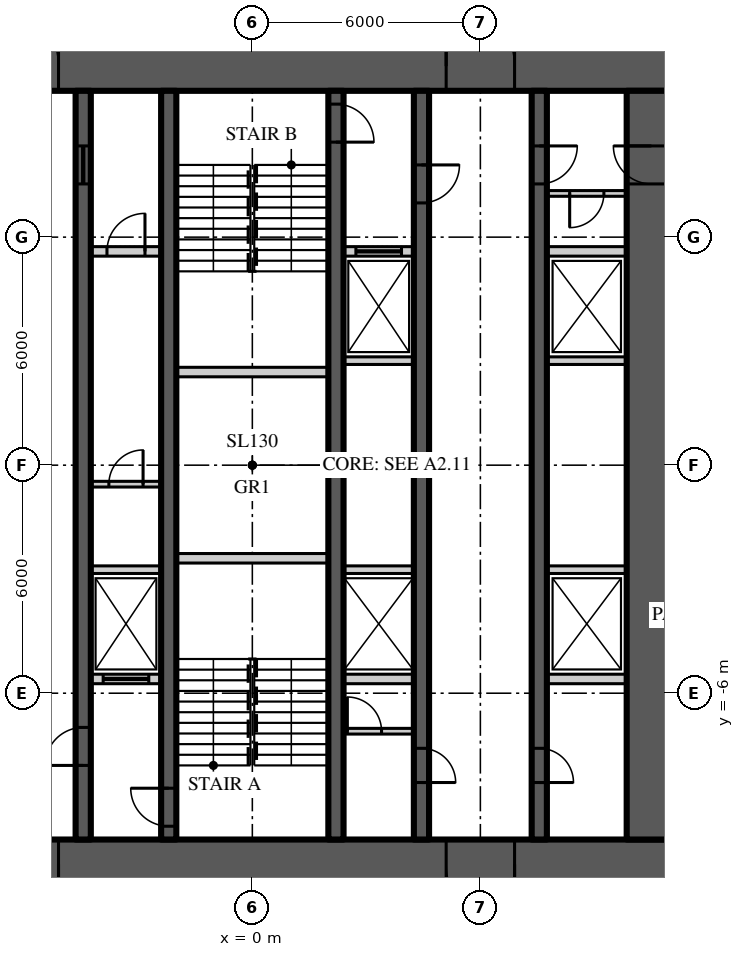
"""IFC4 building model, lengths in metres.
Left out: names, types, materials, properties, quantities, classifications, styles, units other than length and angle.
Written with IfcOpenShell. Run it as: python <this file> out.ifc"""

import sys

from ifc_helpers import new_model, si_unit, direction, frame, frame_2d, origin, place, context, subcontext, project, spatial, rectangle, extrude, element, fill, save


model = new_model("IFC4")
c1 = context("Model", 3, precision=1e-05, world=origin(), true_north=direction((0.0, 1.0)))
c2 = subcontext(c1, "Body", "Model", "MODEL_VIEW")
j1 = project(units=[si_unit("LENGTHUNIT", "METRE"), si_unit("PLANEANGLEUNIT", "RADIAN")], contexts=[c1])
p1 = place(None, origin())
s1 = spatial("IfcSite", under=j1, at=p1, CompositionType="ELEMENT")
p2 = place(p1, origin())
s2 = spatial("IfcBuilding", under=s1, at=p2, CompositionType="ELEMENT")
p3 = place(p2, frame((0.0, 0.0, 55.2)))
s3 = spatial("IfcBuildingStorey", under=s2, at=p3, CompositionType="ELEMENT", Elevation=55.2)
p4 = place(p3, frame((-11.15, 10.5, 0.0), z_axis=(0.0, 0.0, 1.0), x_axis=(1.0, 0.0, 0.0)))
e1 = element("IfcWall", 1, at=p4, inside=s3, PredefinedType="SHEAR", context=c2, shape_type="SweptSolid", body=[
    extrude(rectangle(XDim=22.3, YDim=1.3, at=frame_2d((11.15, 0.0))), origin(), (0.0, 0.0, 1.0), 3.9),
])
p5 = place(p4, frame((4.25, 0.0, 0.0)))
e2 = element("IfcOpeningElement", 2, at=p5, cuts=e1, PredefinedType="OPENING", context=c2, shape_type="SweptSolid", body=[
    extrude(rectangle(XDim=1.8, YDim=2.2, at=frame_2d((0.9, 1.1))), frame((0.0, 0.66, 0.0), z_axis=(0.0, -1.0, 0.0), x_axis=(1.0, 0.0, 0.0)), (0.0, 0.0, 1.0), 1.32),
])
p6 = place(p4, frame((16.25, 0.0, 0.0)))
e3 = element("IfcOpeningElement", 3, at=p6, cuts=e1, PredefinedType="OPENING", context=c2, shape_type="SweptSolid", body=[
    extrude(rectangle(XDim=1.8, YDim=2.2, at=frame_2d((0.9, 1.1))), frame((0.0, 0.66, 0.0), z_axis=(0.0, -1.0, 0.0), x_axis=(1.0, 0.0, 0.0)), (0.0, 0.0, 1.0), 1.32),
])
p7 = place(p3, frame((11.15, -10.5, 0.0), z_axis=(0.0, 0.0, 1.0), x_axis=(-1.0, 0.0, 0.0)))
e4 = element("IfcWall", 4, at=p7, inside=s3, PredefinedType="SHEAR", context=c2, shape_type="SweptSolid", body=[
    extrude(rectangle(XDim=22.3, YDim=1.3, at=frame_2d((11.15, 0.0))), origin(), (0.0, 0.0, 1.0), 3.9),
])
p8 = place(p7, frame((16.25, 0.0, 0.0)))
e5 = element("IfcOpeningElement", 5, at=p8, cuts=e4, PredefinedType="OPENING", context=c2, shape_type="SweptSolid", body=[
    extrude(rectangle(XDim=1.8, YDim=2.2, at=frame_2d((0.9, 1.1))), frame((0.0, 0.66, 0.0), z_axis=(0.0, -1.0, 0.0), x_axis=(1.0, 0.0, 0.0)), (0.0, 0.0, 1.0), 1.32),
])
p9 = place(p7, frame((4.25, 0.0, 0.0)))
e6 = element("IfcOpeningElement", 6, at=p9, cuts=e4, PredefinedType="OPENING", context=c2, shape_type="SweptSolid", body=[
    extrude(rectangle(XDim=1.8, YDim=2.2, at=frame_2d((0.9, 1.1))), frame((0.0, 0.66, 0.0), z_axis=(0.0, -1.0, 0.0), x_axis=(1.0, 0.0, 0.0)), (0.0, 0.0, 1.0), 1.32),
])
p10 = place(p3, frame((10.5, -9.85, 0.0), z_axis=(0.0, 0.0, 1.0), x_axis=(0.0, 1.0, 0.0)))
e7 = element("IfcWall", 7, at=p10, inside=s3, PredefinedType="SHEAR", context=c2, shape_type="SweptSolid", body=[
    extrude(rectangle(XDim=19.7, YDim=1.3, at=frame_2d((9.85, 0.0))), origin(), (0.0, 0.0, 1.0), 3.9),
])
p11 = place(p10, frame((17.25, 0.0, 0.0)))
e8 = element("IfcOpeningElement", 8, at=p11, cuts=e7, PredefinedType="OPENING", context=c2, shape_type="SweptSolid", body=[
    extrude(rectangle(XDim=1.0, YDim=2.2, at=frame_2d((0.5, 1.1))), frame((0.0, 0.66, 0.0), z_axis=(0.0, -1.0, 0.0), x_axis=(1.0, 0.0, 0.0)), (0.0, 0.0, 1.0), 1.32),
])
p12 = place(p3, frame((7.55, 9.85, 0.0), z_axis=(0.0, 0.0, 1.0), x_axis=(0.0, -1.0, 0.0)))
e9 = element("IfcWall", 9, at=p12, inside=s3, PredefinedType="SHEAR", context=c2, shape_type="SweptSolid", body=[
    extrude(rectangle(XDim=19.7, YDim=0.4, at=frame_2d((9.85, 0.0))), origin(), (0.0, 0.0, 1.0), 3.9),
])
p13 = place(p12, frame((1.45, 0.0, 0.0)))
e10 = element("IfcOpeningElement", 10, at=p13, cuts=e9, PredefinedType="OPENING", context=c2, shape_type="SweptSolid", body=[
    extrude(rectangle(XDim=1.0, YDim=2.2, at=frame_2d((0.5, 1.1))), frame((0.0, 0.21, 0.0), z_axis=(0.0, -1.0, 0.0), x_axis=(1.0, 0.0, 0.0)), (0.0, 0.0, 1.0), 0.42),
])
p14 = place(p12, frame((17.3, 0.0, 0.0)))
e11 = element("IfcOpeningElement", 11, at=p14, cuts=e9, PredefinedType="OPENING", context=c2, shape_type="SweptSolid", body=[
    extrude(rectangle(XDim=0.9, YDim=2.1, at=frame_2d((0.45, 1.05))), frame((0.0, 0.21, 0.0), z_axis=(0.0, -1.0, 0.0), x_axis=(1.0, 0.0, 0.0)), (0.0, 0.0, 1.0), 0.42),
])
p15 = place(p3, frame((-4.45, -9.85, 0.0), z_axis=(0.0, 0.0, 1.0), x_axis=(0.0, 1.0, 0.0)))
e12 = element("IfcWall", 12, at=p15, inside=s3, PredefinedType="SHEAR", context=c2, shape_type="SweptSolid", body=[
    extrude(rectangle(XDim=19.7, YDim=0.4, at=frame_2d((9.85, 0.0))), origin(), (0.0, 0.0, 1.0), 3.9),
])
p16 = place(p15, frame((1.95, 0.0, 0.0)))
e13 = element("IfcOpeningElement", 13, at=p16, cuts=e12, PredefinedType="OPENING", context=c2, shape_type="SweptSolid", body=[
    extrude(rectangle(XDim=1.0, YDim=2.2, at=frame_2d((0.5, 1.1))), frame((0.0, 0.21, 0.0), z_axis=(0.0, -1.0, 0.0), x_axis=(1.0, 0.0, 0.0)), (0.0, 0.0, 1.0), 0.42),
])
p17 = place(p15, frame((17.25, 0.0, 0.0)))
e14 = element("IfcOpeningElement", 14, at=p17, cuts=e12, PredefinedType="OPENING", context=c2, shape_type="SweptSolid", body=[
    extrude(rectangle(XDim=1.0, YDim=2.1, at=frame_2d((0.5, 1.05))), frame((0.0, 0.21, 0.0), z_axis=(0.0, -1.0, 0.0), x_axis=(1.0, 0.0, 0.0)), (0.0, 0.0, 1.0), 0.42),
])
p18 = place(p3, frame((4.45, 9.85, 0.0), z_axis=(0.0, 0.0, 1.0), x_axis=(0.0, -1.0, 0.0)))
e15 = element("IfcWall", 15, at=p18, inside=s3, PredefinedType="SHEAR", context=c2, shape_type="SweptSolid", body=[
    extrude(rectangle(XDim=19.7, YDim=0.4, at=frame_2d((9.85, 0.0))), origin(), (0.0, 0.0, 1.0), 3.9),
])
p19 = place(p18, frame((1.95, 0.0, 0.0)))
e16 = element("IfcOpeningElement", 16, at=p19, cuts=e15, PredefinedType="OPENING", context=c2, shape_type="SweptSolid", body=[
    extrude(rectangle(XDim=1.0, YDim=2.2, at=frame_2d((0.5, 1.1))), frame((0.0, 0.21, 0.0), z_axis=(0.0, -1.0, 0.0), x_axis=(1.0, 0.0, 0.0)), (0.0, 0.0, 1.0), 0.42),
])
p20 = place(p18, frame((17.3, 0.0, 0.0)))
e17 = element("IfcOpeningElement", 17, at=p20, cuts=e15, PredefinedType="OPENING", context=c2, shape_type="SweptSolid", body=[
    extrude(rectangle(XDim=0.9, YDim=2.1, at=frame_2d((0.45, 1.05))), frame((0.0, 0.21, 0.0), z_axis=(0.0, -1.0, 0.0), x_axis=(1.0, 0.0, 0.0)), (0.0, 0.0, 1.0), 0.42),
])
p21 = place(p3, frame((-2.2, -9.85, 0.0), z_axis=(0.0, 0.0, 1.0), x_axis=(0.0, 1.0, 0.0)))
e18 = element("IfcWall", 18, at=p21, inside=s3, PredefinedType="SHEAR", context=c2, shape_type="SweptSolid", body=[
    extrude(rectangle(XDim=19.7, YDim=0.4, at=frame_2d((9.85, 0.0))), origin(), (0.0, 0.0, 1.0), 3.9),
])
p22 = place(p21, frame((0.35, 0.0, 0.0)))
e19 = element("IfcOpeningElement", 19, at=p22, cuts=e18, PredefinedType="OPENING", context=c2, shape_type="SweptSolid", body=[
    extrude(rectangle(XDim=1.0, YDim=2.2, at=frame_2d((0.5, 1.1))), frame((0.0, 0.21, 0.0), z_axis=(0.0, -1.0, 0.0), x_axis=(1.0, 0.0, 0.0)), (0.0, 0.0, 1.0), 0.42),
])
p23 = place(p3, frame((2.2, 9.85, 0.0), z_axis=(0.0, 0.0, 1.0), x_axis=(0.0, -1.0, 0.0)))
e20 = element("IfcWall", 20, at=p23, inside=s3, PredefinedType="SHEAR", context=c2, shape_type="SweptSolid", body=[
    extrude(rectangle(XDim=19.7, YDim=0.4, at=frame_2d((9.85, 0.0))), origin(), (0.0, 0.0, 1.0), 3.9),
])
p24 = place(p23, frame((0.35, 0.0, 0.0)))
e21 = element("IfcOpeningElement", 21, at=p24, cuts=e20, PredefinedType="OPENING", context=c2, shape_type="SweptSolid", body=[
    extrude(rectangle(XDim=1.0, YDim=2.2, at=frame_2d((0.5, 1.1))), frame((0.0, 0.21, 0.0), z_axis=(0.0, -1.0, 0.0), x_axis=(1.0, 0.0, 0.0)), (0.0, 0.0, 1.0), 0.42),
])
p25 = place(p3, frame((-4.25, 5.625, 0.0), z_axis=(0.0, 0.0, 1.0), x_axis=(1.0, 0.0, 0.0)))
e22 = element("IfcWall", 22, at=p25, inside=s3, PredefinedType="SOLIDWALL", context=c2, shape_type="SweptSolid", body=[
    extrude(rectangle(XDim=1.85, YDim=0.25, at=frame_2d((0.925, 0.0))), origin(), (0.0, 0.0, 1.0), 3.7),
])
p26 = place(p25, frame((0.425, 0.0, 0.0)))
e23 = element("IfcOpeningElement", 23, at=p26, cuts=e22, PredefinedType="OPENING", context=c2, shape_type="SweptSolid", body=[
    extrude(rectangle(XDim=1.0, YDim=2.2, at=frame_2d((0.5, 1.1))), frame((0.0, 0.135, 0.0), z_axis=(0.0, -1.0, 0.0), x_axis=(1.0, 0.0, 0.0)), (0.0, 0.0, 1.0), 0.27),
])
p27 = place(p3, frame((2.4, 5.625, 0.0), z_axis=(0.0, 0.0, 1.0), x_axis=(1.0, 0.0, 0.0)))
e24 = element("IfcWall", 24, at=p27, inside=s3, PredefinedType="SOLIDWALL", context=c2, shape_type="SweptSolid", body=[
    extrude(rectangle(XDim=1.85, YDim=0.25, at=frame_2d((0.925, 0.0))), origin(), (0.0, 0.0, 1.0), 3.7),
])
p28 = place(p27, frame((0.325, 0.0, 0.0)))
e25 = element("IfcOpeningElement", 25, at=p28, cuts=e24, PredefinedType="OPENING", context=c2, shape_type="SweptSolid", body=[
    extrude(rectangle(XDim=1.2, YDim=2.2, at=frame_2d((0.6, 1.1))), frame((0.0, 0.135, 0.0), z_axis=(0.0, -1.0, 0.0), x_axis=(1.0, 0.0, 0.0)), (0.0, 0.0, 1.0), 0.27),
])
p29 = place(p3, frame((7.75, 5.625, 0.0), z_axis=(0.0, 0.0, 1.0), x_axis=(1.0, 0.0, 0.0)))
e26 = element("IfcWall", 26, at=p29, inside=s3, PredefinedType="SOLIDWALL", context=c2, shape_type="SweptSolid", body=[
    extrude(rectangle(XDim=2.1, YDim=0.25, at=frame_2d((1.05, 0.0))), origin(), (0.0, 0.0, 1.0), 3.7),
])
p30 = place(p3, frame((-4.25, -5.625, 0.0), z_axis=(0.0, 0.0, 1.0), x_axis=(1.0, 0.0, 0.0)))
e27 = element("IfcWall", 27, at=p30, inside=s3, PredefinedType="SOLIDWALL", context=c2, shape_type="SweptSolid", body=[
    extrude(rectangle(XDim=1.85, YDim=0.25, at=frame_2d((0.925, 0.0))), origin(), (0.0, 0.0, 1.0), 3.7),
])
p31 = place(p30, frame((0.325, 0.0, 0.0)))
e28 = element("IfcOpeningElement", 28, at=p31, cuts=e27, PredefinedType="OPENING", context=c2, shape_type="SweptSolid", body=[
    extrude(rectangle(XDim=1.2, YDim=2.2, at=frame_2d((0.6, 1.1))), frame((0.0, 0.135, 0.0), z_axis=(0.0, -1.0, 0.0), x_axis=(1.0, 0.0, 0.0)), (0.0, 0.0, 1.0), 0.27),
])
p32 = place(p3, frame((2.4, -5.625, 0.0), z_axis=(0.0, 0.0, 1.0), x_axis=(1.0, 0.0, 0.0)))
e29 = element("IfcWall", 29, at=p32, inside=s3, PredefinedType="SOLIDWALL", context=c2, shape_type="SweptSolid", body=[
    extrude(rectangle(XDim=1.85, YDim=0.25, at=frame_2d((0.925, 0.0))), origin(), (0.0, 0.0, 1.0), 3.7),
])
p33 = place(p3, frame((7.75, -5.625, 0.0), z_axis=(0.0, 0.0, 1.0), x_axis=(1.0, 0.0, 0.0)))
e30 = element("IfcWall", 30, at=p33, inside=s3, PredefinedType="SOLIDWALL", context=c2, shape_type="SweptSolid", body=[
    extrude(rectangle(XDim=2.1, YDim=0.25, at=frame_2d((1.05, 0.0))), origin(), (0.0, 0.0, 1.0), 3.7),
])
for number, where, z_axis, x_axis in (
    (31, (-2.0, -2.45, 0.0), (0.0, 0.0, 1.0), (1.0, 0.0, 0.0)),
    (32, (-2.0, 2.45, 0.0), (0.0, 0.0, 1.0), (1.0, 0.0, 0.0)),
):
    element("IfcWall", number, at=place(p3, frame(where, z_axis=z_axis, x_axis=x_axis)), inside=s3, PredefinedType="SOLIDWALL", context=c2, shape_type="SweptSolid", body=[
        extrude(rectangle(XDim=4.0, YDim=0.25, at=frame_2d((2.0, 0.0))), origin(), (0.0, 0.0, 1.0), 3.7),
    ])
for number, where, z_axis, x_axis in (
    (33, (-4.25, -2.75, 0.0), (0.0, 0.0, 1.0), (1.0, 0.0, 0.0)),
    (34, (2.4, -2.75, 0.0), (0.0, 0.0, 1.0), (1.0, 0.0, 0.0)),
):
    element("IfcWall", number, at=place(p3, frame(where, z_axis=z_axis, x_axis=x_axis)), inside=s3, PredefinedType="SOLIDWALL", context=c2, shape_type="SweptSolid", body=[
        extrude(rectangle(XDim=1.85, YDim=0.2, at=frame_2d((0.925, 0.0))), origin(), (0.0, 0.0, 1.0), 3.7),
    ])
p34 = place(p3, frame((7.75, -2.75, 0.0), z_axis=(0.0, 0.0, 1.0), x_axis=(1.0, 0.0, 0.0)))
e35 = element("IfcWall", 35, at=p34, inside=s3, PredefinedType="SOLIDWALL", context=c2, shape_type="SweptSolid", body=[
    extrude(rectangle(XDim=2.1, YDim=0.2, at=frame_2d((1.05, 0.0))), origin(), (0.0, 0.0, 1.0), 3.7),
])
p35 = place(p3, frame((2.4, 2.75, 0.0), z_axis=(0.0, 0.0, 1.0), x_axis=(1.0, 0.0, 0.0)))
e36 = element("IfcWall", 36, at=p35, inside=s3, PredefinedType="SOLIDWALL", context=c2, shape_type="SweptSolid", body=[
    extrude(rectangle(XDim=1.85, YDim=0.2, at=frame_2d((0.925, 0.0))), origin(), (0.0, 0.0, 1.0), 3.7),
])
p36 = place(p3, frame((7.75, 2.75, 0.0), z_axis=(0.0, 0.0, 1.0), x_axis=(1.0, 0.0, 0.0)))
e37 = element("IfcWall", 37, at=p36, inside=s3, PredefinedType="SOLIDWALL", context=c2, shape_type="SweptSolid", body=[
    extrude(rectangle(XDim=2.1, YDim=0.2, at=frame_2d((1.05, 0.0))), origin(), (0.0, 0.0, 1.0), 3.7),
])
p37 = place(p3, frame((-4.25, -0.5, 0.0), z_axis=(0.0, 0.0, 1.0), x_axis=(1.0, 0.0, 0.0)))
e38 = element("IfcWall", 38, at=p37, inside=s3, PredefinedType="SOLIDWALL", context=c2, shape_type="SweptSolid", body=[
    extrude(rectangle(XDim=1.85, YDim=0.15, at=frame_2d((0.925, 0.0))), origin(), (0.0, 0.0, 1.0), 3.77),
])
p38 = place(p37, frame((0.475, 0.0, 0.0)))
e39 = element("IfcOpeningElement", 39, at=p38, cuts=e38, PredefinedType="OPENING", context=c2, shape_type="SweptSolid", body=[
    extrude(rectangle(XDim=0.9, YDim=2.1, at=frame_2d((0.45, 1.05))), frame((0.0, 0.085, 0.0), z_axis=(0.0, -1.0, 0.0), x_axis=(1.0, 0.0, 0.0)), (0.0, 0.0, 1.0), 0.17),
])
p39 = place(p3, frame((2.4, -7.0, 0.0), z_axis=(0.0, 0.0, 1.0), x_axis=(1.0, 0.0, 0.0)))
e40 = element("IfcWall", 40, at=p39, inside=s3, PredefinedType="SOLIDWALL", context=c2, shape_type="SweptSolid", body=[
    extrude(rectangle(XDim=1.85, YDim=0.15, at=frame_2d((0.925, 0.0))), origin(), (0.0, 0.0, 1.0), 3.77),
])
p40 = place(p39, frame((0.1, 0.0, 0.0)))
e41 = element("IfcOpeningElement", 41, at=p40, cuts=e40, PredefinedType="OPENING", context=c2, shape_type="SweptSolid", body=[
    extrude(rectangle(XDim=0.9, YDim=2.1, at=frame_2d((0.45, 1.05))), frame((0.0, 0.085, 0.0), z_axis=(0.0, -1.0, 0.0), x_axis=(1.0, 0.0, 0.0)), (0.0, 0.0, 1.0), 0.17),
])
p41 = place(p3, frame((9.85, 7.15, 0.0), z_axis=(0.0, 0.0, 1.0), x_axis=(-1.0, 0.0, 0.0)))
e42 = element("IfcWall", 42, at=p41, inside=s3, PredefinedType="SOLIDWALL", context=c2, shape_type="SweptSolid", body=[
    extrude(rectangle(XDim=2.1, YDim=0.15, at=frame_2d((1.05, 0.0))), origin(), (0.0, 0.0, 1.0), 3.77),
])
p42 = place(p41, frame((0.6, 0.0, 0.0)))
e43 = element("IfcOpeningElement", 43, at=p42, cuts=e42, PredefinedType="OPENING", context=c2, shape_type="SweptSolid", body=[
    extrude(rectangle(XDim=0.9, YDim=2.1, at=frame_2d((0.45, 1.05))), frame((0.0, 0.085, 0.0), z_axis=(0.0, -1.0, 0.0), x_axis=(1.0, 0.0, 0.0)), (0.0, 0.0, 1.0), 0.17),
])
p43 = place(p5, origin())
e44 = element("IfcDoor", 44, at=p43, inside=s3, OperationType="DOUBLE_DOOR_DOUBLE_SWING", PredefinedType="DOOR", context=c2, shape_type="SweptSolid", body=[
    extrude(rectangle(XDim=1.8, YDim=2.2, at=frame_2d((0.9, 1.1))), frame((0.0, 0.025, 0.0), z_axis=(0.0, -1.0, 0.0), x_axis=(1.0, 0.0, 0.0)), (0.0, 0.0, 1.0), 0.05),
])
fill(e2, e44)
p44 = place(p8, origin())
e45 = element("IfcDoor", 45, at=p44, inside=s3, OperationType="DOUBLE_DOOR_DOUBLE_SWING", PredefinedType="DOOR", context=c2, shape_type="SweptSolid", body=[
    extrude(rectangle(XDim=1.8, YDim=2.2, at=frame_2d((0.9, 1.1))), frame((0.0, 0.025, 0.0), z_axis=(0.0, -1.0, 0.0), x_axis=(1.0, 0.0, 0.0)), (0.0, 0.0, 1.0), 0.05),
])
fill(e5, e45)
p45 = place(p6, origin())
e46 = element("IfcDoor", 46, at=p45, inside=s3, OperationType="DOUBLE_DOOR_DOUBLE_SWING", PredefinedType="DOOR", context=c2, shape_type="SweptSolid", body=[
    extrude(rectangle(XDim=1.8, YDim=2.2, at=frame_2d((0.9, 1.1))), frame((0.0, 0.025, 0.0), z_axis=(0.0, -1.0, 0.0), x_axis=(1.0, 0.0, 0.0)), (0.0, 0.0, 1.0), 0.05),
])
fill(e3, e46)
p46 = place(p9, origin())
e47 = element("IfcDoor", 47, at=p46, inside=s3, OperationType="DOUBLE_DOOR_DOUBLE_SWING", PredefinedType="DOOR", context=c2, shape_type="SweptSolid", body=[
    extrude(rectangle(XDim=1.8, YDim=2.2, at=frame_2d((0.9, 1.1))), frame((0.0, 0.025, 0.0), z_axis=(0.0, -1.0, 0.0), x_axis=(1.0, 0.0, 0.0)), (0.0, 0.0, 1.0), 0.05),
])
fill(e6, e47)
p47 = place(p13, origin())
e48 = element("IfcDoor", 48, at=p47, inside=s3, OperationType="SINGLE_SWING_LEFT", PredefinedType="DOOR", context=c2, shape_type="SweptSolid", body=[
    extrude(rectangle(XDim=1.0, YDim=2.2, at=frame_2d((0.5, 1.1))), frame((0.0, 0.025, 0.0), z_axis=(0.0, -1.0, 0.0), x_axis=(1.0, 0.0, 0.0)), (0.0, 0.0, 1.0), 0.05),
])
fill(e10, e48)
p48 = place(p11, origin())
e49 = element("IfcDoor", 49, at=p48, inside=s3, OperationType="SINGLE_SWING_RIGHT", PredefinedType="DOOR", context=c2, shape_type="SweptSolid", body=[
    extrude(rectangle(XDim=1.0, YDim=2.2, at=frame_2d((0.5, 1.1))), frame((0.0, 0.025, 0.0), z_axis=(0.0, -1.0, 0.0), x_axis=(1.0, 0.0, 0.0)), (0.0, 0.0, 1.0), 0.05),
])
fill(e8, e49)
p49 = place(p16, origin())
e50 = element("IfcDoor", 50, at=p49, inside=s3, OperationType="SINGLE_SWING_LEFT", PredefinedType="DOOR", context=c2, shape_type="SweptSolid", body=[
    extrude(rectangle(XDim=1.0, YDim=2.2, at=frame_2d((0.5, 1.1))), frame((0.0, 0.025, 0.0), z_axis=(0.0, -1.0, 0.0), x_axis=(1.0, 0.0, 0.0)), (0.0, 0.0, 1.0), 0.05),
])
fill(e13, e50)
p50 = place(p22, origin())
e51 = element("IfcDoor", 51, at=p50, inside=s3, OperationType="SINGLE_SWING_RIGHT", PredefinedType="DOOR", context=c2, shape_type="SweptSolid", body=[
    extrude(rectangle(XDim=1.0, YDim=2.2, at=frame_2d((0.5, 1.1))), frame((0.0, 0.025, 0.0), z_axis=(0.0, -1.0, 0.0), x_axis=(1.0, 0.0, 0.0)), (0.0, 0.0, 1.0), 0.05),
])
fill(e19, e51)
p51 = place(p19, origin())
e52 = element("IfcDoor", 52, at=p51, inside=s3, OperationType="SINGLE_SWING_LEFT", PredefinedType="DOOR", context=c2, shape_type="SweptSolid", body=[
    extrude(rectangle(XDim=1.0, YDim=2.2, at=frame_2d((0.5, 1.1))), frame((0.0, 0.025, 0.0), z_axis=(0.0, -1.0, 0.0), x_axis=(1.0, 0.0, 0.0)), (0.0, 0.0, 1.0), 0.05),
])
fill(e16, e52)
p52 = place(p24, origin())
e53 = element("IfcDoor", 53, at=p52, inside=s3, OperationType="SINGLE_SWING_RIGHT", PredefinedType="DOOR", context=c2, shape_type="SweptSolid", body=[
    extrude(rectangle(XDim=1.0, YDim=2.2, at=frame_2d((0.5, 1.1))), frame((0.0, 0.025, 0.0), z_axis=(0.0, -1.0, 0.0), x_axis=(1.0, 0.0, 0.0)), (0.0, 0.0, 1.0), 0.05),
])
fill(e21, e53)
p53 = place(p17, origin())
e54 = element("IfcDoor", 54, at=p53, inside=s3, OperationType="SLIDING_TO_LEFT", PredefinedType="DOOR", context=c2, shape_type="SweptSolid", body=[
    extrude(rectangle(XDim=1.0, YDim=2.1, at=frame_2d((0.5, 1.05))), frame((0.0, 0.025, 0.0), z_axis=(0.0, -1.0, 0.0), x_axis=(1.0, 0.0, 0.0)), (0.0, 0.0, 1.0), 0.05),
])
fill(e14, e54)
p54 = place(p14, origin())
e55 = element("IfcDoor", 55, at=p54, inside=s3, OperationType="SINGLE_SWING_RIGHT", PredefinedType="DOOR", context=c2, shape_type="SweptSolid", body=[
    extrude(rectangle(XDim=0.9, YDim=2.1, at=frame_2d((0.45, 1.05))), frame((0.0, 0.025, 0.0), z_axis=(0.0, -1.0, 0.0), x_axis=(1.0, 0.0, 0.0)), (0.0, 0.0, 1.0), 0.05),
])
fill(e11, e55)
p55 = place(p20, origin())
e56 = element("IfcDoor", 56, at=p55, inside=s3, OperationType="SINGLE_SWING_RIGHT", PredefinedType="DOOR", context=c2, shape_type="SweptSolid", body=[
    extrude(rectangle(XDim=0.9, YDim=2.1, at=frame_2d((0.45, 1.05))), frame((0.0, 0.025, 0.0), z_axis=(0.0, -1.0, 0.0), x_axis=(1.0, 0.0, 0.0)), (0.0, 0.0, 1.0), 0.05),
])
fill(e17, e56)
p56 = place(p31, origin())
e57 = element("IfcDoor", 57, at=p56, inside=s3, OperationType="SLIDING_TO_LEFT", PredefinedType="DOOR", context=c2, shape_type="SweptSolid", body=[
    extrude(rectangle(XDim=1.2, YDim=2.2, at=frame_2d((0.6, 1.1))), frame((0.0, 0.025, 0.0), z_axis=(0.0, -1.0, 0.0), x_axis=(1.0, 0.0, 0.0)), (0.0, 0.0, 1.0), 0.05),
])
fill(e28, e57)
p57 = place(p28, origin())
e58 = element("IfcDoor", 58, at=p57, inside=s3, OperationType="SLIDING_TO_LEFT", PredefinedType="DOOR", context=c2, shape_type="SweptSolid", body=[
    extrude(rectangle(XDim=1.2, YDim=2.2, at=frame_2d((0.6, 1.1))), frame((0.0, 0.025, 0.0), z_axis=(0.0, -1.0, 0.0), x_axis=(1.0, 0.0, 0.0)), (0.0, 0.0, 1.0), 0.05),
])
fill(e25, e58)
p58 = place(p38, origin())
e59 = element("IfcDoor", 59, at=p58, inside=s3, OperationType="SINGLE_SWING_RIGHT", PredefinedType="DOOR", context=c2, shape_type="SweptSolid", body=[
    extrude(rectangle(XDim=0.9, YDim=2.1, at=frame_2d((0.45, 1.05))), frame((0.0, 0.025, 0.0), z_axis=(0.0, -1.0, 0.0), x_axis=(1.0, 0.0, 0.0)), (0.0, 0.0, 1.0), 0.05),
])
fill(e39, e59)
p59 = place(p26, origin())
e60 = element("IfcDoor", 60, at=p59, inside=s3, OperationType="SINGLE_SWING_RIGHT", PredefinedType="DOOR", context=c2, shape_type="SweptSolid", body=[
    extrude(rectangle(XDim=1.0, YDim=2.2, at=frame_2d((0.5, 1.1))), frame((0.0, 0.025, 0.0), z_axis=(0.0, -1.0, 0.0), x_axis=(1.0, 0.0, 0.0)), (0.0, 0.0, 1.0), 0.05),
])
fill(e23, e60)
p60 = place(p40, origin())
e61 = element("IfcDoor", 61, at=p60, inside=s3, OperationType="SINGLE_SWING_LEFT", PredefinedType="DOOR", context=c2, shape_type="SweptSolid", body=[
    extrude(rectangle(XDim=0.9, YDim=2.1, at=frame_2d((0.45, 1.05))), frame((0.0, 0.025, 0.0), z_axis=(0.0, -1.0, 0.0), x_axis=(1.0, 0.0, 0.0)), (0.0, 0.0, 1.0), 0.05),
])
fill(e41, e61)
p61 = place(p42, origin())
e62 = element("IfcDoor", 62, at=p61, inside=s3, OperationType="SINGLE_SWING_RIGHT", PredefinedType="DOOR", context=c2, shape_type="SweptSolid", body=[
    extrude(rectangle(XDim=0.9, YDim=2.1, at=frame_2d((0.45, 1.05))), frame((0.0, 0.025, 0.0), z_axis=(0.0, -1.0, 0.0), x_axis=(1.0, 0.0, 0.0)), (0.0, 0.0, 1.0), 0.05),
])
fill(e43, e62)
save(model, sys.argv[1])
